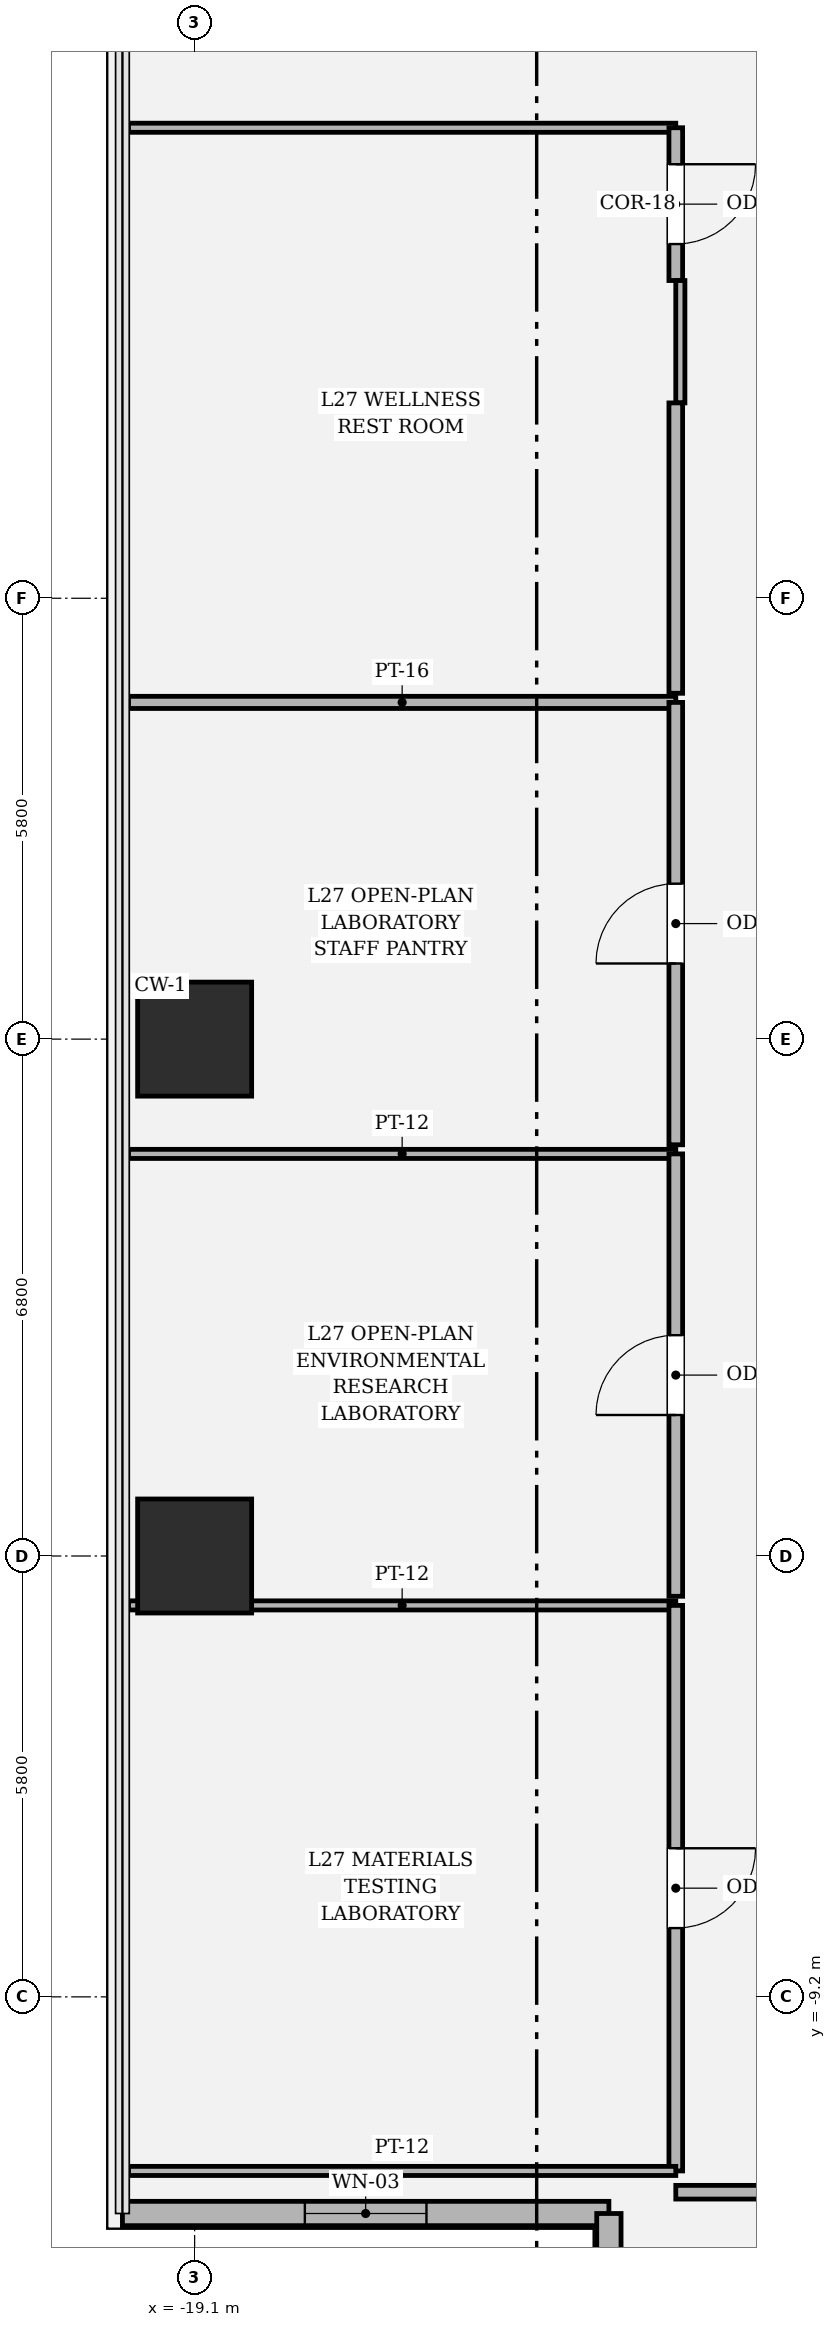
"""IFC4 building model, lengths in metres.
Left out: names, types, materials, properties, quantities, classifications, styles, units other than length and angle.
Written with IfcOpenShell. Run it as: python <this file> out.ifc"""

import sys

from ifc_helpers import new_model, si_unit, direction, frame, frame_2d, origin, origin_2d, place, context, subcontext, project, spatial, rectangle, hollow_rectangle, extrude, element, fill, save


model = new_model("IFC4")
c1 = context("Model", 3, precision=1e-05, world=origin(), true_north=direction((0.0, 1.0)))
c2 = subcontext(c1, "Body", "Model", "MODEL_VIEW")
j1 = project(units=[si_unit("LENGTHUNIT", "METRE"), si_unit("PLANEANGLEUNIT", "RADIAN")], contexts=[c1])
p1 = place(None, origin())
s1 = spatial("IfcSite", under=j1, at=p1, CompositionType="ELEMENT")
p2 = place(p1, origin())
s2 = spatial("IfcBuilding", under=s1, at=p2, CompositionType="ELEMENT")
p3 = place(p2, frame((0.0, 0.0, 117.3)))
s3 = spatial("IfcBuildingStorey", under=s2, at=p3, CompositionType="ELEMENT", Elevation=117.3)
for number, where, z_axis, x_axis in (
    (1, (-19.1, 3.4, 0.0), (0.0, 0.0, 1.0), (1.0, 0.0, 0.0)),
    (2, (-19.1, -3.4, 0.0), (0.0, 0.0, 1.0), (1.0, 0.0, 0.0)),
):
    element("IfcColumn", number, at=place(p3, frame(where, z_axis=z_axis, x_axis=x_axis)), inside=s3, PredefinedType="COLUMN", context=c2, shape_type="SweptSolid", body=[
        extrude(hollow_rectangle(XDim=1.5, YDim=1.5, WallThickness=0.045, at=origin_2d()), origin(), (0.0, 0.0, 1.0), 4.05),
    ])
p4 = place(p3, frame((-20.05, -12.05, 0.0), z_axis=(0.0, 0.0, 1.0), x_axis=(1.0, 0.0, 0.0)))
e3 = element("IfcWall", 3, at=p4, inside=s3, PredefinedType="SOLIDWALL", context=c2, shape_type="SweptSolid", body=[
    extrude(rectangle(XDim=6.4, YDim=0.32, at=frame_2d((3.2, 0.0))), origin(), (0.0, 0.0, 1.0), 3.104),
])
p5 = place(p4, frame((2.4, 0.0, 0.464)))
e4 = element("IfcOpeningElement", 4, at=p5, cuts=e3, PredefinedType="OPENING", context=c2, shape_type="SweptSolid", body=[
    extrude(rectangle(XDim=1.6, YDim=2.4, at=frame_2d((0.8, 1.2))), frame((0.0, 0.17, 0.0), z_axis=(0.0, -1.0, 0.0), x_axis=(1.0, 0.0, 0.0)), (0.0, 0.0, 1.0), 0.34),
])
p6 = place(p3, frame((-13.65, -12.05, 0.0), z_axis=(0.0, 0.0, 1.0), x_axis=(0.0, -1.0, 0.0)))
e5 = element("IfcWall", 5, at=p6, inside=s3, PredefinedType="SOLIDWALL", context=c2, shape_type="SweptSolid", body=[
    extrude(rectangle(XDim=6.4, YDim=0.32, at=frame_2d((3.2, 0.0))), origin(), (0.0, 0.0, 1.0), 3.104),
])
p7 = place(p6, frame((2.4, 0.0, 0.464)))
e6 = element("IfcOpeningElement", 6, at=p7, cuts=e5, PredefinedType="OPENING", context=c2, shape_type="SweptSolid", body=[
    extrude(rectangle(XDim=1.6, YDim=2.4, at=frame_2d((0.8, 1.2))), frame((0.0, 0.17, 0.0), z_axis=(0.0, -1.0, 0.0), x_axis=(1.0, 0.0, 0.0)), (0.0, 0.0, 1.0), 0.34),
])
p8 = place(p3, frame((-12.77, -11.77, 0.0), z_axis=(0.0, 0.0, 1.0), x_axis=(1.0, 0.0, 0.0)))
e7 = element("IfcWall", 7, at=p8, inside=s3, PredefinedType="PARTITIONING", context=c2, shape_type="SweptSolid", body=[
    extrude(rectangle(XDim=11.57, YDim=0.18, at=frame_2d((5.785, 0.0))), origin(), (0.0, 0.0, 1.0), 3.104),
])
p9 = place(p8, frame((5.26, 0.0, 0.0)))
e8 = element("IfcOpeningElement", 8, at=p9, cuts=e7, PredefinedType="OPENING", context=c2, shape_type="SweptSolid", body=[
    extrude(rectangle(XDim=1.05, YDim=2.2, at=frame_2d((0.525, 1.1))), frame((0.0, 0.1, 0.0), z_axis=(0.0, -1.0, 0.0), x_axis=(1.0, 0.0, 0.0)), (0.0, 0.0, 1.0), 0.2),
])
p10 = place(p3, frame((-19.97, -4.05, 0.0), z_axis=(0.0, 0.0, 1.0), x_axis=(1.0, 0.0, 0.0)))
e9 = element("IfcWall", 9, at=p10, inside=s3, PredefinedType="PARTITIONING", context=c2, shape_type="SweptSolid", body=[
    extrude(rectangle(XDim=7.2, YDim=0.12, at=frame_2d((3.6, 0.0))), origin(), (0.0, 0.0, 1.0), 3.104),
])
p11 = place(p3, frame((-12.77, -4.05, 0.0), z_axis=(0.0, 0.0, 1.0), x_axis=(0.0, -1.0, 0.0)))
e10 = element("IfcWall", 10, at=p11, inside=s3, PredefinedType="PARTITIONING", context=c2, shape_type="SweptSolid", body=[
    extrude(rectangle(XDim=7.44, YDim=0.18, at=frame_2d((3.72, 0.0))), origin(), (0.0, 0.0, 1.0), 3.104),
])
p12 = place(p11, frame((3.195, 0.0, 0.0)))
e11 = element("IfcOpeningElement", 11, at=p12, cuts=e10, PredefinedType="OPENING", context=c2, shape_type="SweptSolid", body=[
    extrude(rectangle(XDim=1.05, YDim=2.2, at=frame_2d((0.525, 1.1))), frame((0.0, 0.1, 0.0), z_axis=(0.0, -1.0, 0.0), x_axis=(1.0, 0.0, 0.0)), (0.0, 0.0, 1.0), 0.2),
])
for number, where, z_axis, x_axis in (
    (12, (-12.77, -11.49, 0.0), (0.0, 0.0, 1.0), (-1.0, 0.0, 0.0)),
    (13, (-19.97, 1.89, 0.0), (0.0, 0.0, 1.0), (1.0, 0.0, 0.0)),
):
    element("IfcWall", number, at=place(p3, frame(where, z_axis=z_axis, x_axis=x_axis)), inside=s3, PredefinedType="PARTITIONING", context=c2, shape_type="SweptSolid", body=[
        extrude(rectangle(XDim=7.2, YDim=0.12, at=frame_2d((3.6, 0.0))), origin(), (0.0, 0.0, 1.0), 3.104),
    ])
p13 = place(p3, frame((-12.77, 1.89, 0.0), z_axis=(0.0, 0.0, 1.0), x_axis=(0.0, -1.0, 0.0)))
e14 = element("IfcWall", 14, at=p13, inside=s3, PredefinedType="PARTITIONING", context=c2, shape_type="SweptSolid", body=[
    extrude(rectangle(XDim=5.82, YDim=0.18, at=frame_2d((2.91, 0.0))), origin(), (0.0, 0.0, 1.0), 3.104),
])
p14 = place(p13, frame((2.385, 0.0, 0.0)))
e15 = element("IfcOpeningElement", 15, at=p14, cuts=e14, PredefinedType="OPENING", context=c2, shape_type="SweptSolid", body=[
    extrude(rectangle(XDim=1.05, YDim=2.2, at=frame_2d((0.525, 1.1))), frame((0.0, 0.1, 0.0), z_axis=(0.0, -1.0, 0.0), x_axis=(1.0, 0.0, 0.0)), (0.0, 0.0, 1.0), 0.2),
])
p15 = place(p3, frame((-19.97, 7.83, 0.0), z_axis=(0.0, 0.0, 1.0), x_axis=(1.0, 0.0, 0.0)))
e16 = element("IfcWall", 16, at=p15, inside=s3, PredefinedType="PARTITIONING", context=c2, shape_type="SweptSolid", body=[
    extrude(rectangle(XDim=7.2, YDim=0.16, at=frame_2d((3.6, 0.0))), origin(), (0.0, 0.0, 1.0), 3.104),
])
p16 = place(p3, frame((-12.77, 7.83, 0.0), z_axis=(0.0, 0.0, 1.0), x_axis=(0.0, -1.0, 0.0)))
e17 = element("IfcWall", 17, at=p16, inside=s3, PredefinedType="PARTITIONING", context=c2, shape_type="SweptSolid", body=[
    extrude(rectangle(XDim=5.82, YDim=0.18, at=frame_2d((2.91, 0.0))), origin(), (0.0, 0.0, 1.0), 3.104),
])
p17 = place(p16, frame((2.385, 0.0, 0.0)))
e18 = element("IfcOpeningElement", 18, at=p17, cuts=e17, PredefinedType="OPENING", context=c2, shape_type="SweptSolid", body=[
    extrude(rectangle(XDim=1.05, YDim=2.2, at=frame_2d((0.525, 1.1))), frame((0.0, 0.1, 0.0), z_axis=(0.0, -1.0, 0.0), x_axis=(1.0, 0.0, 0.0)), (0.0, 0.0, 1.0), 0.2),
])
p18 = place(p3, frame((-19.97, 15.39, 0.0), z_axis=(0.0, 0.0, 1.0), x_axis=(1.0, 0.0, 0.0)))
e19 = element("IfcWall", 19, at=p18, inside=s3, PredefinedType="PARTITIONING", context=c2, shape_type="SweptSolid", body=[
    extrude(rectangle(XDim=7.2, YDim=0.12, at=frame_2d((3.6, 0.0))), origin(), (0.0, 0.0, 1.0), 3.104),
])
p19 = place(p3, frame((-12.77, 15.39, 0.0), z_axis=(0.0, 0.0, 1.0), x_axis=(0.0, -1.0, 0.0)))
e20 = element("IfcWall", 20, at=p19, inside=s3, PredefinedType="PARTITIONING", context=c2, shape_type="SweptSolid", body=[
    extrude(rectangle(XDim=2.01, YDim=0.18, at=frame_2d((1.005, 0.0))), origin(), (0.0, 0.0, 1.0), 3.354),
])
p20 = place(p19, frame((0.48, 0.0, 0.0)))
e21 = element("IfcOpeningElement", 21, at=p20, cuts=e20, PredefinedType="OPENING", context=c2, shape_type="SweptSolid", body=[
    extrude(rectangle(XDim=1.05, YDim=2.2, at=frame_2d((0.525, 1.1))), frame((0.0, 0.1, 0.0), z_axis=(0.0, -1.0, 0.0), x_axis=(1.0, 0.0, 0.0)), (0.0, 0.0, 1.0), 0.2),
])
p21 = place(p3, frame((-12.71, 13.38, 0.0), z_axis=(0.0, 0.0, 1.0), x_axis=(0.0, -1.0, 0.0)))
e22 = element("IfcWall", 22, at=p21, inside=s3, PredefinedType="PARTITIONING", context=c2, shape_type="SweptSolid", body=[
    extrude(rectangle(XDim=1.61, YDim=0.12, at=frame_2d((0.805, 0.0))), origin(), (0.0, 0.0, 1.0), 3.354),
])
p22 = place(p3, frame((-12.77, 11.77, 0.0), z_axis=(0.0, 0.0, 1.0), x_axis=(0.0, -1.0, 0.0)))
e23 = element("IfcWall", 23, at=p22, inside=s3, PredefinedType="PARTITIONING", context=c2, shape_type="SweptSolid", body=[
    extrude(rectangle(XDim=3.82, YDim=0.18, at=frame_2d((1.91, 0.0))), origin(), (0.0, 0.0, 1.0), 3.104),
])
p23 = place(p5, origin())
e24 = element("IfcWindow", 24, at=p23, inside=s3, PartitioningType="SINGLE_PANEL", PredefinedType="WINDOW", context=c2, shape_type="SweptSolid", body=[
    extrude(rectangle(XDim=1.6, YDim=2.4, at=frame_2d((0.8, 1.2))), frame((0.0, 0.03, 0.0), z_axis=(0.0, -1.0, 0.0), x_axis=(1.0, 0.0, 0.0)), (0.0, 0.0, 1.0), 0.06),
])
fill(e4, e24)
p24 = place(p12, origin())
e25 = element("IfcDoor", 25, at=p24, inside=s3, OperationType="SINGLE_SWING_LEFT", PredefinedType="DOOR", context=c2, shape_type="SweptSolid", body=[
    extrude(rectangle(XDim=1.05, YDim=2.2, at=frame_2d((0.525, 1.1))), frame((0.0, 0.025, 0.0), z_axis=(0.0, -1.0, 0.0), x_axis=(1.0, 0.0, 0.0)), (0.0, 0.0, 1.0), 0.05),
])
fill(e11, e25)
p25 = place(p14, origin())
e26 = element("IfcDoor", 26, at=p25, inside=s3, OperationType="SINGLE_SWING_RIGHT", PredefinedType="DOOR", context=c2, shape_type="SweptSolid", body=[
    extrude(rectangle(XDim=1.05, YDim=2.2, at=frame_2d((0.525, 1.1))), frame((0.0, 0.025, 0.0), z_axis=(0.0, -1.0, 0.0), x_axis=(1.0, 0.0, 0.0)), (0.0, 0.0, 1.0), 0.05),
])
fill(e15, e26)
p26 = place(p17, origin())
e27 = element("IfcDoor", 27, at=p26, inside=s3, OperationType="SINGLE_SWING_RIGHT", PredefinedType="DOOR", context=c2, shape_type="SweptSolid", body=[
    extrude(rectangle(XDim=1.05, YDim=2.2, at=frame_2d((0.525, 1.1))), frame((0.0, 0.025, 0.0), z_axis=(0.0, -1.0, 0.0), x_axis=(1.0, 0.0, 0.0)), (0.0, 0.0, 1.0), 0.05),
])
fill(e18, e27)
p27 = place(p20, origin())
e28 = element("IfcDoor", 28, at=p27, inside=s3, OperationType="SINGLE_SWING_LEFT", PredefinedType="DOOR", context=c2, shape_type="SweptSolid", body=[
    extrude(rectangle(XDim=1.05, YDim=2.2, at=frame_2d((0.525, 1.1))), frame((0.0, 0.025, 0.0), z_axis=(0.0, -1.0, 0.0), x_axis=(1.0, 0.0, 0.0)), (0.0, 0.0, 1.0), 0.05),
])
fill(e21, e28)
save(model, sys.argv[1])
